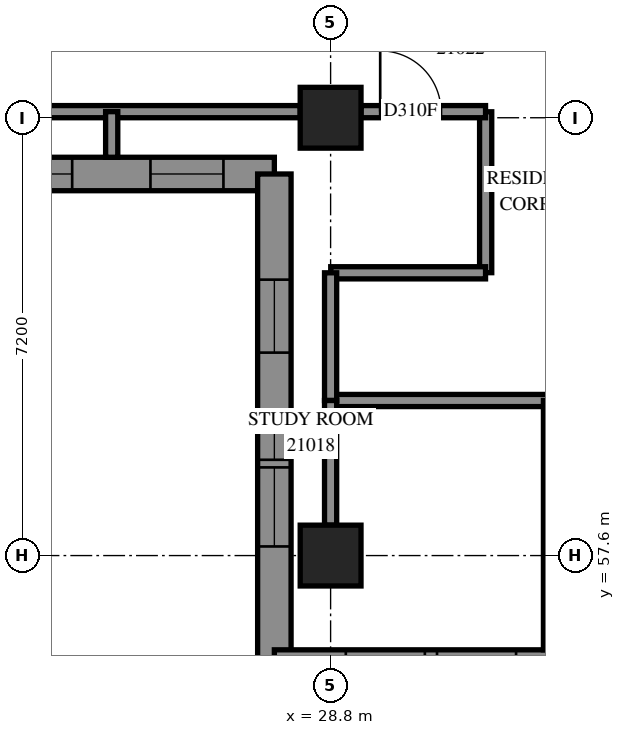
"""IFC4 building model, lengths in metres.
Left out: names, types, materials, properties, quantities, classifications, styles, units other than length and angle.
Written with IfcOpenShell. Run it as: python <this file> out.ifc"""

import sys

from ifc_helpers import new_model, si_unit, direction, frame, frame_2d, origin, origin_2d, place, context, subcontext, project, spatial, polyline, rectangle, outline, extrude, element, fill, save


model = new_model("IFC4")
c1 = context("Model", 3, precision=1e-05, world=origin(), true_north=direction((0.0, 1.0)))
c2 = subcontext(c1, "Body", "Model", "MODEL_VIEW")
j1 = project(units=[si_unit("LENGTHUNIT", "METRE"), si_unit("PLANEANGLEUNIT", "RADIAN")], contexts=[c1])
p1 = place(None, origin())
s1 = spatial("IfcSite", under=j1, at=p1, CompositionType="ELEMENT")
p2 = place(p1, origin())
s2 = spatial("IfcBuilding", under=s1, at=p2, CompositionType="ELEMENT")
p3 = place(p2, frame((0.0, 0.0, 81.2)))
s3 = spatial("IfcBuildingStorey", under=s2, at=p3, CompositionType="ELEMENT", Elevation=81.2)
for number, where, z_axis, x_axis in (
    (1, (28.8, 57.6, 0.0), (0.0, 0.0, 1.0), (1.0, 0.0, 0.0)),
    (2, (28.8, 64.8, 0.0), (0.0, 0.0, 1.0), (1.0, 0.0, 0.0)),
):
    element("IfcColumn", number, at=place(p3, frame(where, z_axis=z_axis, x_axis=x_axis)), inside=s3, PredefinedType="COLUMN", context=c2, shape_type="SweptSolid", body=[
        extrude(rectangle(XDim=1.0, YDim=1.0, at=origin_2d()), origin(), (0.0, 0.0, 1.0), 3.1),
    ])
p4 = place(p3, frame((19.775, 63.875, 0.0), z_axis=(0.0, 0.0, 1.0), x_axis=(1.0, 0.0, 0.0)))
e3 = element("IfcWall", 3, at=p4, inside=s3, PredefinedType="SOLIDWALL", context=c2, shape_type="SweptSolid", body=[
    extrude(outline(polyline([(-0.275, -0.275), (7.825, -0.275), (8.375, 0.275), (0.275, 0.275), (-0.275, -0.275)])), origin(), (0.0, 0.0, 1.0), 3.1),
])
p5 = place(p4, frame((1.975, 0.0, 0.5)))
e4 = element("IfcOpeningElement", 4, at=p5, cuts=e3, PredefinedType="OPENING", context=c2, shape_type="SweptSolid", body=[
    extrude(rectangle(XDim=1.3, YDim=2.45, at=frame_2d((0.65, 1.225))), frame((0.0, 0.285, 0.0), z_axis=(0.0, -1.0, 0.0), x_axis=(1.0, 0.0, 0.0)), (0.0, 0.0, 1.0), 0.57),
])
p6 = place(p4, frame((3.475, 0.0, 0.5)))
e5 = element("IfcOpeningElement", 5, at=p6, cuts=e3, PredefinedType="OPENING", context=c2, shape_type="SweptSolid", body=[
    extrude(rectangle(XDim=1.3, YDim=2.45, at=frame_2d((0.65, 1.225))), frame((0.0, 0.285, 0.0), z_axis=(0.0, -1.0, 0.0), x_axis=(1.0, 0.0, 0.0)), (0.0, 0.0, 1.0), 0.57),
])
p7 = place(p4, frame((6.062, 0.0, 0.5)))
e6 = element("IfcOpeningElement", 6, at=p7, cuts=e3, PredefinedType="OPENING", context=c2, shape_type="SweptSolid", body=[
    extrude(rectangle(XDim=1.2, YDim=2.45, at=frame_2d((0.6, 1.225))), frame((0.0, 0.285, 0.0), z_axis=(0.0, -1.0, 0.0), x_axis=(1.0, 0.0, 0.0)), (0.0, 0.0, 1.0), 0.57),
])
p8 = place(p3, frame((27.875, 63.875, 0.0), z_axis=(0.0, 0.0, 1.0), x_axis=(0.0, -1.0, 0.0)))
e7 = element("IfcWall", 7, at=p8, inside=s3, PredefinedType="SOLIDWALL", context=c2, shape_type="SweptSolid", body=[
    extrude(outline(polyline([(0.275, -0.275), (8.375, -0.275), (7.825, 0.275), (-0.275, 0.275), (0.275, -0.275)])), origin(), (0.0, 0.0, 1.0), 3.1),
])
p9 = place(p8, frame((4.825, 0.0, 0.5)))
e8 = element("IfcOpeningElement", 8, at=p9, cuts=e7, PredefinedType="OPENING", context=c2, shape_type="SweptSolid", body=[
    extrude(rectangle(XDim=1.3, YDim=2.45, at=frame_2d((0.65, 1.225))), frame((0.0, 0.285, 0.0), z_axis=(0.0, -1.0, 0.0), x_axis=(1.0, 0.0, 0.0)), (0.0, 0.0, 1.0), 0.57),
])
p10 = place(p8, frame((1.738, 0.0, 0.5)))
e9 = element("IfcOpeningElement", 9, at=p10, cuts=e7, PredefinedType="OPENING", context=c2, shape_type="SweptSolid", body=[
    extrude(rectangle(XDim=1.2, YDim=2.45, at=frame_2d((0.6, 1.225))), frame((0.0, 0.285, 0.0), z_axis=(0.0, -1.0, 0.0), x_axis=(1.0, 0.0, 0.0)), (0.0, 0.0, 1.0), 0.57),
])
p11 = place(p8, frame((3.9, 0.0, 0.45)))
e10 = element("IfcOpeningElement", 10, at=p11, cuts=e7, PredefinedType="OPENING", context=c2, shape_type="SweptSolid", body=[
    extrude(rectangle(XDim=0.8, YDim=2.5, at=frame_2d((0.4, 1.25))), frame((0.0, 0.285, 0.0), z_axis=(0.0, -1.0, 0.0), x_axis=(1.0, 0.0, 0.0)), (0.0, 0.0, 1.0), 0.57),
])
p12 = place(p3, frame((27.875, 55.775, 0.0), z_axis=(0.0, 0.0, 1.0), x_axis=(1.0, 0.0, 0.0)))
e11 = element("IfcWall", 11, at=p12, inside=s3, PredefinedType="SOLIDWALL", context=c2, shape_type="SweptSolid", body=[
    extrude(outline(polyline([(-0.275, -0.275), (14.125, -0.275), (14.675, 0.275), (0.275, 0.275), (-0.275, -0.275)])), origin(), (0.0, 0.0, 1.0), 3.1),
])
p13 = place(p12, frame((1.175, 0.0, 0.5)))
e12 = element("IfcOpeningElement", 12, at=p13, cuts=e11, PredefinedType="OPENING", context=c2, shape_type="SweptSolid", body=[
    extrude(rectangle(XDim=1.3, YDim=2.45, at=frame_2d((0.65, 1.225))), frame((0.0, 0.285, 0.0), z_axis=(0.0, -1.0, 0.0), x_axis=(1.0, 0.0, 0.0)), (0.0, 0.0, 1.0), 0.57),
])
p14 = place(p12, frame((2.675, 0.0, 0.5)))
e13 = element("IfcOpeningElement", 13, at=p14, cuts=e11, PredefinedType="OPENING", context=c2, shape_type="SweptSolid", body=[
    extrude(rectangle(XDim=1.3, YDim=2.45, at=frame_2d((0.65, 1.225))), frame((0.0, 0.285, 0.0), z_axis=(0.0, -1.0, 0.0), x_axis=(1.0, 0.0, 0.0)), (0.0, 0.0, 1.0), 0.57),
])
p15 = place(p12, frame((4.925, 0.0, 0.5)))
e14 = element("IfcOpeningElement", 14, at=p15, cuts=e11, PredefinedType="OPENING", context=c2, shape_type="SweptSolid", body=[
    extrude(rectangle(XDim=1.3, YDim=2.45, at=frame_2d((0.65, 1.225))), frame((0.0, 0.285, 0.0), z_axis=(0.0, -1.0, 0.0), x_axis=(1.0, 0.0, 0.0)), (0.0, 0.0, 1.0), 0.57),
])
p16 = place(p12, frame((6.425, 0.0, 0.5)))
e15 = element("IfcOpeningElement", 15, at=p16, cuts=e11, PredefinedType="OPENING", context=c2, shape_type="SweptSolid", body=[
    extrude(rectangle(XDim=1.3, YDim=2.45, at=frame_2d((0.65, 1.225))), frame((0.0, 0.285, 0.0), z_axis=(0.0, -1.0, 0.0), x_axis=(1.0, 0.0, 0.0)), (0.0, 0.0, 1.0), 0.57),
])
p17 = place(p12, frame((8.275, 0.0, 0.5)))
e16 = element("IfcOpeningElement", 16, at=p17, cuts=e11, PredefinedType="OPENING", context=c2, shape_type="SweptSolid", body=[
    extrude(rectangle(XDim=1.3, YDim=2.45, at=frame_2d((0.65, 1.225))), frame((0.0, 0.285, 0.0), z_axis=(0.0, -1.0, 0.0), x_axis=(1.0, 0.0, 0.0)), (0.0, 0.0, 1.0), 0.57),
])
p18 = place(p12, frame((9.775, 0.0, 0.5)))
e17 = element("IfcOpeningElement", 17, at=p18, cuts=e11, PredefinedType="OPENING", context=c2, shape_type="SweptSolid", body=[
    extrude(rectangle(XDim=1.3, YDim=2.45, at=frame_2d((0.65, 1.225))), frame((0.0, 0.285, 0.0), z_axis=(0.0, -1.0, 0.0), x_axis=(1.0, 0.0, 0.0)), (0.0, 0.0, 1.0), 0.57),
])
p19 = place(p12, frame((12.363, 0.0, 0.5)))
e18 = element("IfcOpeningElement", 18, at=p19, cuts=e11, PredefinedType="OPENING", context=c2, shape_type="SweptSolid", body=[
    extrude(rectangle(XDim=1.2, YDim=2.45, at=frame_2d((0.6, 1.225))), frame((0.0, 0.285, 0.0), z_axis=(0.0, -1.0, 0.0), x_axis=(1.0, 0.0, 0.0)), (0.0, 0.0, 1.0), 0.57),
])
p20 = place(p3, frame((28.8, 60.15, 0.0), z_axis=(0.0, 0.0, 1.0), x_axis=(1.0, 0.0, 0.0)))
e19 = element("IfcWall", 19, at=p20, inside=s3, PredefinedType="PARTITIONING", context=c2, shape_type="SweptSolid", body=[
    extrude(rectangle(XDim=24.15, YDim=0.2, at=frame_2d((12.075, 0.0))), origin(), (0.0, 0.0, 1.0), 3.1),
])
p21 = place(p20, frame((11.325, 0.0, 0.0)))
e20 = element("IfcOpeningElement", 20, at=p21, cuts=e19, PredefinedType="OPENING", context=c2, shape_type="SweptSolid", body=[
    extrude(rectangle(XDim=1.0, YDim=2.1, at=frame_2d((0.5, 1.05))), frame((0.0, 0.11, 0.0), z_axis=(0.0, -1.0, 0.0), x_axis=(1.0, 0.0, 0.0)), (0.0, 0.0, 1.0), 0.22),
])
p22 = place(p20, frame((14.8, 0.0, 0.0)))
e21 = element("IfcOpeningElement", 21, at=p22, cuts=e19, PredefinedType="OPENING", context=c2, shape_type="SweptSolid", body=[
    extrude(rectangle(XDim=0.9, YDim=2.1, at=frame_2d((0.45, 1.05))), frame((0.0, 0.11, 0.0), z_axis=(0.0, -1.0, 0.0), x_axis=(1.0, 0.0, 0.0)), (0.0, 0.0, 1.0), 0.22),
])
p23 = place(p20, frame((18.508, 0.0, 0.0)))
e22 = element("IfcOpeningElement", 22, at=p23, cuts=e19, PredefinedType="OPENING", context=c2, shape_type="SweptSolid", body=[
    extrude(rectangle(XDim=1.0, YDim=2.1, at=frame_2d((0.5, 1.05))), frame((0.0, 0.11, 0.0), z_axis=(0.0, -1.0, 0.0), x_axis=(1.0, 0.0, 0.0)), (0.0, 0.0, 1.0), 0.22),
])
p24 = place(p20, frame((22.882, 0.0, 0.0)))
e23 = element("IfcOpeningElement", 23, at=p24, cuts=e19, PredefinedType="OPENING", context=c2, shape_type="SweptSolid", body=[
    extrude(rectangle(XDim=1.0, YDim=2.1, at=frame_2d((0.5, 1.05))), frame((0.0, 0.11, 0.0), z_axis=(0.0, -1.0, 0.0), x_axis=(1.0, 0.0, 0.0)), (0.0, 0.0, 1.0), 0.22),
])
p25 = place(p3, frame((22.1, 64.9, 0.0), z_axis=(0.0, 0.0, 1.0), x_axis=(1.0, 0.0, 0.0)))
e24 = element("IfcWall", 24, at=p25, inside=s3, PredefinedType="PARTITIONING", context=c2, shape_type="SweptSolid", body=[
    extrude(rectangle(XDim=6.2, YDim=0.2, at=frame_2d((3.1, 0.0))), origin(), (0.0, 0.0, 1.0), 2.6),
])
p26 = place(p3, frame((32.4, 56.05, 0.0), z_axis=(0.0, 0.0, 1.0), x_axis=(0.0, 1.0, 0.0)))
e25 = element("IfcWall", 25, at=p26, inside=s3, PredefinedType="PARTITIONING", context=c2, shape_type="SweptSolid", body=[
    extrude(rectangle(XDim=4.1, YDim=0.2, at=frame_2d((2.05, 0.0))), origin(), (0.0, 0.0, 1.0), 3.1),
])
p27 = place(p3, frame((31.35, 62.252, 0.0), z_axis=(0.0, 0.0, 1.0), x_axis=(0.0, 1.0, 0.0)))
e26 = element("IfcWall", 26, at=p27, inside=s3, PredefinedType="PARTITIONING", context=c2, shape_type="SweptSolid", body=[
    extrude(rectangle(XDim=2.646, YDim=0.2, at=frame_2d((1.323, 0.0))), origin(), (0.0, 0.0, 1.0), 3.1),
])
p28 = place(p3, frame((28.802, 62.25, 0.0), z_axis=(0.0, 0.0, 1.0), x_axis=(1.0, 0.0, 0.0)))
e27 = element("IfcWall", 27, at=p28, inside=s3, PredefinedType="PARTITIONING", context=c2, shape_type="SweptSolid", body=[
    extrude(rectangle(XDim=2.546, YDim=0.2, at=frame_2d((1.273, 0.0))), origin(), (0.0, 0.0, 1.0), 3.1),
])
p29 = place(p3, frame((28.8, 60.15, 0.0), z_axis=(0.0, 0.0, 1.0), x_axis=(0.0, 1.0, 0.0)))
e28 = element("IfcWall", 28, at=p29, inside=s3, PredefinedType="PARTITIONING", context=c2, shape_type="SweptSolid", body=[
    extrude(rectangle(XDim=2.1, YDim=0.2, at=frame_2d((1.05, 0.0))), origin(), (0.0, 0.0, 1.0), 2.6),
])
p30 = place(p3, frame((28.8, 58.1, 0.0), z_axis=(0.0, 0.0, 1.0), x_axis=(0.0, 1.0, 0.0)))
e29 = element("IfcWall", 29, at=p30, inside=s3, PredefinedType="PARTITIONING", context=c2, shape_type="SweptSolid", body=[
    extrude(rectangle(XDim=2.05, YDim=0.2, at=frame_2d((1.025, 0.0))), origin(), (0.0, 0.0, 1.0), 2.6),
])
p31 = place(p3, frame((29.3, 64.9, 0.0), z_axis=(0.0, 0.0, 1.0), x_axis=(1.0, 0.0, 0.0)))
e30 = element("IfcWall", 30, at=p31, inside=s3, PredefinedType="PARTITIONING", context=c2, shape_type="SweptSolid", body=[
    extrude(rectangle(XDim=2.048, YDim=0.2, at=frame_2d((1.024, 0.0))), origin(), (0.0, 0.0, 1.0), 3.1),
])
p32 = place(p31, frame((0.316, 0.0, 0.0)))
e31 = element("IfcOpeningElement", 31, at=p32, cuts=e30, PredefinedType="OPENING", context=c2, shape_type="SweptSolid", body=[
    extrude(rectangle(XDim=1.0, YDim=2.1, at=frame_2d((0.5, 1.05))), frame((0.0, 0.11, 0.0), z_axis=(0.0, -1.0, 0.0), x_axis=(1.0, 0.0, 0.0)), (0.0, 0.0, 1.0), 0.22),
])
p33 = place(p3, frame((25.2, 64.15, 0.0), z_axis=(0.0, 0.0, 1.0), x_axis=(0.0, 1.0, 0.0)))
e32 = element("IfcWall", 32, at=p33, inside=s3, PredefinedType="PARTITIONING", context=c2, shape_type="SweptSolid", body=[
    extrude(rectangle(XDim=0.75, YDim=0.2, at=frame_2d((0.375, 0.0))), origin(), (0.0, 0.0, 1.0), 3.1),
])
p34 = place(p6, origin())
e33 = element("IfcWindow", 33, at=p34, inside=s3, PartitioningType="SINGLE_PANEL", PredefinedType="WINDOW", context=c2, shape_type="SweptSolid", body=[
    extrude(rectangle(XDim=1.3, YDim=2.45, at=frame_2d((0.65, 1.225))), frame((0.0, 0.155, 0.0), z_axis=(0.0, -1.0, 0.0), x_axis=(1.0, 0.0, 0.0)), (0.0, 0.0, 1.0), 0.06),
])
fill(e5, e33)
p35 = place(p7, origin())
e34 = element("IfcWindow", 34, at=p35, inside=s3, PartitioningType="SINGLE_PANEL", PredefinedType="WINDOW", context=c2, shape_type="SweptSolid", body=[
    extrude(rectangle(XDim=1.2, YDim=2.45, at=frame_2d((0.6, 1.225))), frame((0.0, 0.155, 0.0), z_axis=(0.0, -1.0, 0.0), x_axis=(1.0, 0.0, 0.0)), (0.0, 0.0, 1.0), 0.06),
])
fill(e6, e34)
p36 = place(p9, origin())
e35 = element("IfcWindow", 35, at=p36, inside=s3, PartitioningType="SINGLE_PANEL", PredefinedType="WINDOW", context=c2, shape_type="SweptSolid", body=[
    extrude(rectangle(XDim=1.3, YDim=2.45, at=frame_2d((0.65, 1.225))), frame((0.0, 0.155, 0.0), z_axis=(0.0, -1.0, 0.0), x_axis=(1.0, 0.0, 0.0)), (0.0, 0.0, 1.0), 0.06),
])
fill(e8, e35)
p37 = place(p10, origin())
e36 = element("IfcWindow", 36, at=p37, inside=s3, PartitioningType="SINGLE_PANEL", PredefinedType="WINDOW", context=c2, shape_type="SweptSolid", body=[
    extrude(rectangle(XDim=1.2, YDim=2.45, at=frame_2d((0.6, 1.225))), frame((0.0, 0.155, 0.0), z_axis=(0.0, -1.0, 0.0), x_axis=(1.0, 0.0, 0.0)), (0.0, 0.0, 1.0), 0.06),
])
fill(e9, e36)
p38 = place(p32, origin())
e37 = element("IfcDoor", 37, at=p38, inside=s3, OperationType="SINGLE_SWING_RIGHT", PredefinedType="DOOR", context=c2, shape_type="SweptSolid", body=[
    extrude(rectangle(XDim=1.0, YDim=2.1, at=frame_2d((0.5, 1.05))), frame((0.0, 0.025, 0.0), z_axis=(0.0, -1.0, 0.0), x_axis=(1.0, 0.0, 0.0)), (0.0, 0.0, 1.0), 0.05),
])
fill(e31, e37)
p39 = place(p11, origin())
e38 = element("IfcWindow", 38, at=p39, inside=s3, PartitioningType="SINGLE_PANEL", PredefinedType="WINDOW", context=c2, shape_type="SweptSolid", body=[
    extrude(rectangle(XDim=0.8, YDim=2.5, at=frame_2d((0.4, 1.25))), frame((0.0, 0.155, 0.0), z_axis=(0.0, -1.0, 0.0), x_axis=(1.0, 0.0, 0.0)), (0.0, 0.0, 1.0), 0.06),
])
fill(e10, e38)
save(model, sys.argv[1])
